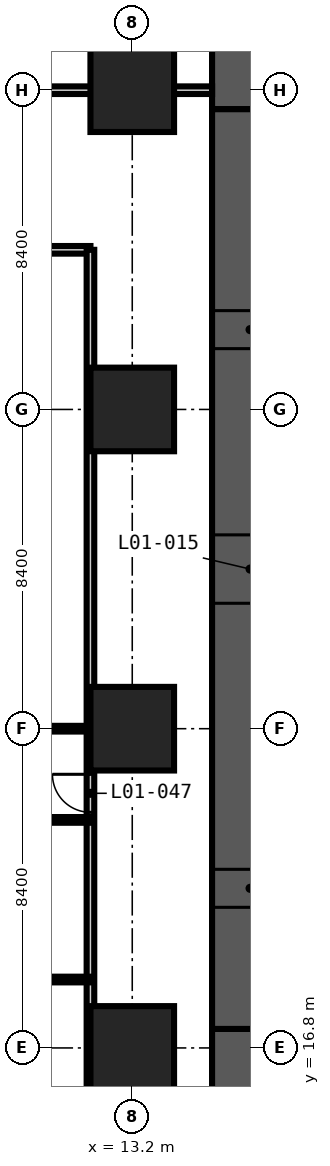
"""IFC4 building model, lengths in metres.
Left out: names, types, materials, properties, quantities, classifications, styles, units other than length and angle.
Written with IfcOpenShell. Run it as: python <this file> out.ifc"""

import sys

from ifc_helpers import new_model, si_unit, direction, frame, frame_2d, origin, origin_2d, place, context, subcontext, project, spatial, rectangle, extrude, element, fill, save


model = new_model("IFC4")
c1 = context("Model", 3, precision=1e-05, world=origin(), true_north=direction((0.0, 1.0)))
c2 = subcontext(c1, "Body", "Model", "MODEL_VIEW")
j1 = project(units=[si_unit("LENGTHUNIT", "METRE"), si_unit("PLANEANGLEUNIT", "RADIAN")], contexts=[c1])
p1 = place(None, origin())
s1 = spatial("IfcSite", under=j1, at=p1, CompositionType="ELEMENT")
p2 = place(p1, origin())
s2 = spatial("IfcBuilding", under=s1, at=p2, CompositionType="ELEMENT")
p3 = place(p2, frame((0.0, 0.0, 6.0)))
s3 = spatial("IfcBuildingStorey", under=s2, at=p3, CompositionType="ELEMENT", Elevation=6.0)
for number, where, z_axis, x_axis in (
    (1, (13.2, 16.8, -0.3), (0.0, 0.0, 1.0), (1.0, 0.0, 0.0)),
    (2, (13.2, 25.2, -0.3), (0.0, 0.0, 1.0), (1.0, 0.0, 0.0)),
    (3, (13.2, 33.6, -0.3), (0.0, 0.0, 1.0), (1.0, 0.0, 0.0)),
    (4, (13.2, 42.0, -0.3), (0.0, 0.0, 1.0), (1.0, 0.0, 0.0)),
):
    element("IfcColumn", number, at=place(p3, frame(where, z_axis=z_axis, x_axis=x_axis)), inside=s3, PredefinedType="COLUMN", context=c2, shape_type="SweptSolid", body=[
        extrude(rectangle(XDim=2.2, YDim=2.2, at=origin_2d()), origin(), (0.0, 0.0, 1.0), 6.0),
    ])
p4 = place(p3, frame((15.3, 16.3, -0.3), z_axis=(0.0, 0.0, 1.0), x_axis=(1.0, 0.0, 0.0)))
e5 = element("IfcWall", 5, at=p4, inside=s3, PredefinedType="SHEAR", context=c2, shape_type="SweptSolid", body=[
    extrude(rectangle(XDim=28.2, YDim=2.0, at=frame_2d((14.1, 0.0))), origin(), (0.0, 0.0, 1.0), 6.0),
])
p5 = place(p4, frame((13.6, 0.0, 0.3)))
e6 = element("IfcOpeningElement", 6, at=p5, cuts=e5, PredefinedType="OPENING", context=c2, shape_type="SweptSolid", body=[
    extrude(rectangle(XDim=1.0, YDim=2.1, at=frame_2d((0.5, 1.05))), frame((0.0, 1.01, 0.0), z_axis=(0.0, -1.0, 0.0), x_axis=(1.0, 0.0, 0.0)), (0.0, 0.0, 1.0), 2.02),
])
p6 = place(p4, frame((19.9, 0.0, 0.3)))
e7 = element("IfcOpeningElement", 7, at=p6, cuts=e5, PredefinedType="OPENING", context=c2, shape_type="SweptSolid", body=[
    extrude(rectangle(XDim=1.0, YDim=2.1, at=frame_2d((0.5, 1.05))), frame((0.0, 1.01, 0.0), z_axis=(0.0, -1.0, 0.0), x_axis=(1.0, 0.0, 0.0)), (0.0, 0.0, 1.0), 2.02),
])
p7 = place(p3, frame((43.5, 42.5, -0.3), z_axis=(0.0, 0.0, 1.0), x_axis=(-1.0, 0.0, 0.0)))
e8 = element("IfcWall", 8, at=p7, inside=s3, PredefinedType="SHEAR", context=c2, shape_type="SweptSolid", body=[
    extrude(rectangle(XDim=28.2, YDim=2.0, at=frame_2d((14.1, 0.0))), origin(), (0.0, 0.0, 1.0), 6.0),
])
p8 = place(p7, frame((21.4, 0.0, 0.3)))
e9 = element("IfcOpeningElement", 9, at=p8, cuts=e8, PredefinedType="OPENING", context=c2, shape_type="SweptSolid", body=[
    extrude(rectangle(XDim=1.0, YDim=2.1, at=frame_2d((0.5, 1.05))), frame((0.0, 1.01, 0.0), z_axis=(0.0, -1.0, 0.0), x_axis=(1.0, 0.0, 0.0)), (0.0, 0.0, 1.0), 2.02),
])
p9 = place(p7, frame((11.4, 0.0, 0.3)))
e10 = element("IfcOpeningElement", 10, at=p9, cuts=e8, PredefinedType="OPENING", context=c2, shape_type="SweptSolid", body=[
    extrude(rectangle(XDim=1.2, YDim=2.2, at=frame_2d((0.6, 1.1))), frame((0.0, 1.01, 0.0), z_axis=(0.0, -1.0, 0.0), x_axis=(1.0, 0.0, 0.0)), (0.0, 0.0, 1.0), 2.02),
])
p10 = place(p3, frame((16.3, 41.5, -0.3), z_axis=(0.0, 0.0, 1.0), x_axis=(0.0, -1.0, 0.0)))
e11 = element("IfcWall", 11, at=p10, inside=s3, PredefinedType="SHEAR", context=c2, shape_type="SweptSolid", body=[
    extrude(rectangle(XDim=24.2, YDim=2.0, at=frame_2d((12.1, 0.0))), origin(), (0.0, 0.0, 1.0), 6.0),
])
p11 = place(p10, frame((11.2, 0.0, 0.3)))
e12 = element("IfcOpeningElement", 12, at=p11, cuts=e11, PredefinedType="OPENING", context=c2, shape_type="SweptSolid", body=[
    extrude(rectangle(XDim=1.8, YDim=2.2, at=frame_2d((0.9, 1.1))), frame((0.0, 1.01, 0.0), z_axis=(0.0, -1.0, 0.0), x_axis=(1.0, 0.0, 0.0)), (0.0, 0.0, 1.0), 2.02),
])
p12 = place(p10, frame((20.0, 0.0, 0.3)))
e13 = element("IfcOpeningElement", 13, at=p12, cuts=e11, PredefinedType="OPENING", context=c2, shape_type="SweptSolid", body=[
    extrude(rectangle(XDim=1.0, YDim=2.1, at=frame_2d((0.5, 1.05))), frame((0.0, 1.01, 0.0), z_axis=(0.0, -1.0, 0.0), x_axis=(1.0, 0.0, 0.0)), (0.0, 0.0, 1.0), 2.02),
])
p13 = place(p10, frame((5.3, 0.0, 0.3)))
e14 = element("IfcOpeningElement", 14, at=p13, cuts=e11, PredefinedType="OPENING", context=c2, shape_type="SweptSolid", body=[
    extrude(rectangle(XDim=1.0, YDim=2.1, at=frame_2d((0.5, 1.05))), frame((0.0, 1.01, 0.0), z_axis=(0.0, -1.0, 0.0), x_axis=(1.0, 0.0, 0.0)), (0.0, 0.0, 1.0), 2.02),
])
p14 = place(p3, frame((12.1, 12.6, 0.0), z_axis=(0.0, 0.0, 1.0), x_axis=(0.0, 1.0, 0.0)))
e15 = element("IfcWall", 15, at=p14, inside=s3, PredefinedType="PARTITIONING", context=c2, shape_type="SweptSolid", body=[
    extrude(rectangle(XDim=12.6, YDim=0.2, at=frame_2d((6.3, 0.0))), origin(), (0.0, 0.0, 1.0), 5.7),
])
p15 = place(p14, frame((10.4, 0.0, 0.0)))
e16 = element("IfcOpeningElement", 16, at=p15, cuts=e15, PredefinedType="OPENING", context=c2, shape_type="SweptSolid", body=[
    extrude(rectangle(XDim=1.0, YDim=2.1, at=frame_2d((0.5, 1.05))), frame((0.0, 0.11, 0.0), z_axis=(0.0, -1.0, 0.0), x_axis=(1.0, 0.0, 0.0)), (0.0, 0.0, 1.0), 0.22),
])
p16 = place(p3, frame((0.0, 37.8, 0.0), z_axis=(0.0, 0.0, 1.0), x_axis=(1.0, 0.0, 0.0)))
e17 = element("IfcWall", 17, at=p16, inside=s3, PredefinedType="PARTITIONING", context=c2, shape_type="SweptSolid", body=[
    extrude(rectangle(XDim=12.1, YDim=0.2, at=frame_2d((6.05, 0.0))), origin(), (0.0, 0.0, 1.0), 5.7),
])
p17 = place(p3, frame((12.1, 37.8, 0.0), z_axis=(0.0, 0.0, 1.0), x_axis=(0.0, -1.0, 0.0)))
e18 = element("IfcWall", 18, at=p17, inside=s3, PredefinedType="PARTITIONING", context=c2, shape_type="SweptSolid", body=[
    extrude(rectangle(XDim=12.6, YDim=0.2, at=frame_2d((6.3, 0.0))), origin(), (0.0, 0.0, 1.0), 5.7),
])
p18 = place(p3, frame((15.3, 42.0, 0.0), z_axis=(0.0, 0.0, 1.0), x_axis=(-1.0, 0.0, 0.0)))
e19 = element("IfcWall", 19, at=p18, inside=s3, PredefinedType="PARTITIONING", context=c2, shape_type="SweptSolid", body=[
    extrude(rectangle(XDim=15.3, YDim=0.2, at=frame_2d((7.65, 0.0))), origin(), (0.0, 0.0, 1.0), 5.7),
])
for number, where, z_axis, x_axis in (
    (20, (0.0, 18.6, 0.0), (0.0, 0.0, 1.0), (1.0, 0.0, 0.0)),
    (21, (0.0, 22.8, 0.0), (0.0, 0.0, 1.0), (1.0, 0.0, 0.0)),
    (22, (0.0, 25.2, 0.0), (0.0, 0.0, 1.0), (1.0, 0.0, 0.0)),
):
    element("IfcWall", number, at=place(p3, frame(where, z_axis=z_axis, x_axis=x_axis)), inside=s3, PredefinedType="PARTITIONING", context=c2, shape_type="SweptSolid", body=[
        extrude(rectangle(XDim=12.1, YDim=0.15, at=frame_2d((6.05, 0.0))), origin(), (0.0, 0.0, 1.0), 5.7),
    ])
p19 = place(p11, origin())
e23 = element("IfcDoor", 23, at=p19, inside=s3, OperationType="DOUBLE_DOOR_DOUBLE_SWING", PredefinedType="DOOR", context=c2, shape_type="SweptSolid", body=[
    extrude(rectangle(XDim=1.8, YDim=2.2, at=frame_2d((0.9, 1.1))), frame((0.0, 0.025, 0.0), z_axis=(0.0, -1.0, 0.0), x_axis=(1.0, 0.0, 0.0)), (0.0, 0.0, 1.0), 0.05),
])
fill(e12, e23)
p20 = place(p12, origin())
e24 = element("IfcDoor", 24, at=p20, inside=s3, OperationType="SINGLE_SWING_LEFT", PredefinedType="DOOR", context=c2, shape_type="SweptSolid", body=[
    extrude(rectangle(XDim=1.0, YDim=2.1, at=frame_2d((0.5, 1.05))), frame((0.0, 0.025, 0.0), z_axis=(0.0, -1.0, 0.0), x_axis=(1.0, 0.0, 0.0)), (0.0, 0.0, 1.0), 0.05),
])
fill(e13, e24)
p21 = place(p13, origin())
e25 = element("IfcDoor", 25, at=p21, inside=s3, OperationType="SINGLE_SWING_RIGHT", PredefinedType="DOOR", context=c2, shape_type="SweptSolid", body=[
    extrude(rectangle(XDim=1.0, YDim=2.1, at=frame_2d((0.5, 1.05))), frame((0.0, 0.025, 0.0), z_axis=(0.0, -1.0, 0.0), x_axis=(1.0, 0.0, 0.0)), (0.0, 0.0, 1.0), 0.05),
])
fill(e14, e25)
p22 = place(p15, origin())
e26 = element("IfcDoor", 26, at=p22, inside=s3, OperationType="SINGLE_SWING_RIGHT", PredefinedType="DOOR", context=c2, shape_type="SweptSolid", body=[
    extrude(rectangle(XDim=1.0, YDim=2.1, at=frame_2d((0.5, 1.05))), frame((0.0, 0.025, 0.0), z_axis=(0.0, -1.0, 0.0), x_axis=(1.0, 0.0, 0.0)), (0.0, 0.0, 1.0), 0.05),
])
fill(e16, e26)
save(model, sys.argv[1])
